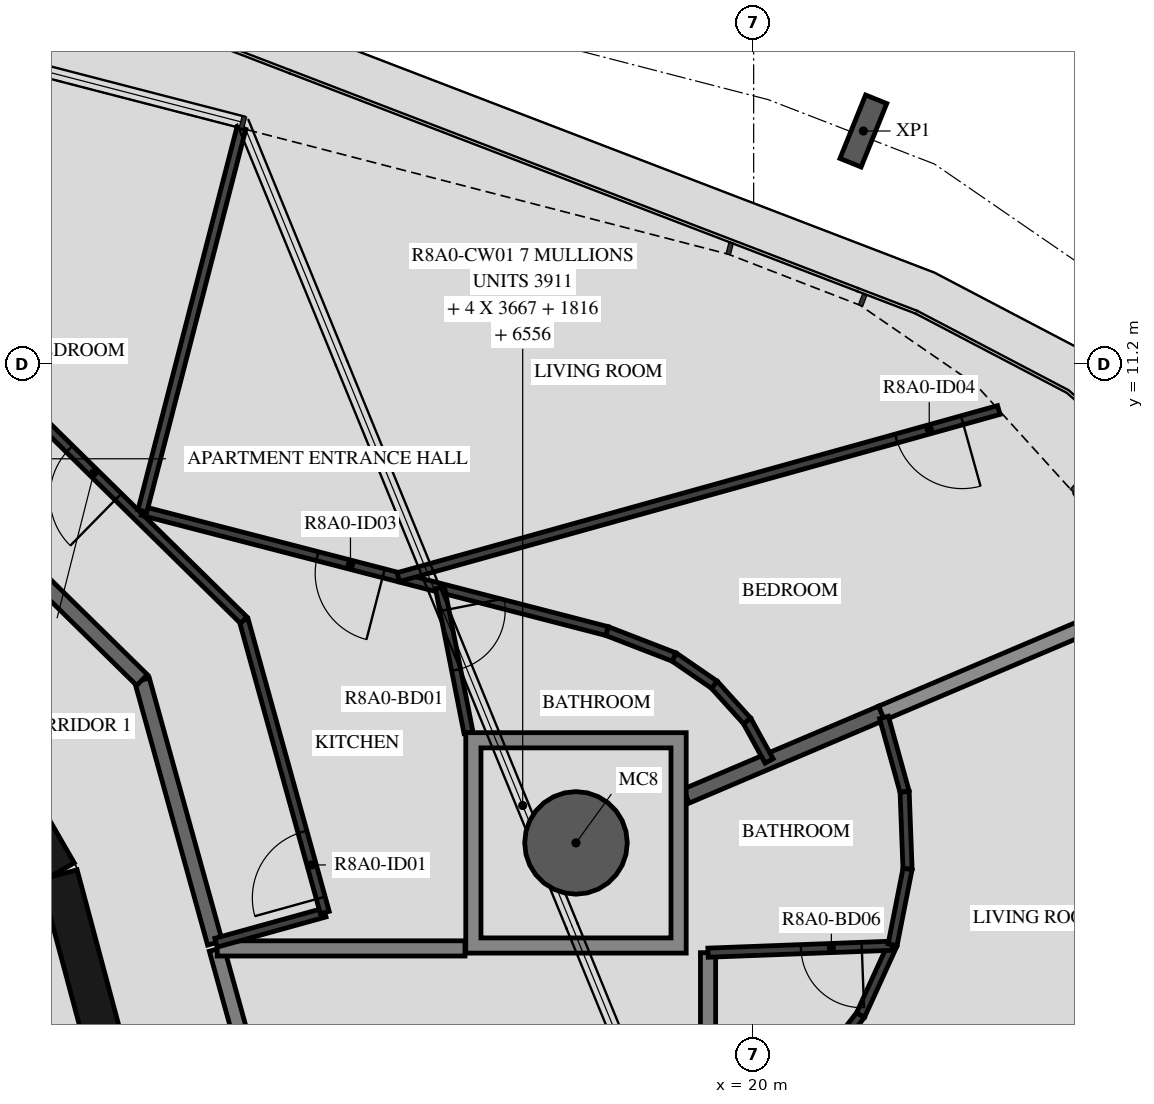
"""IFC4 building model, lengths in metres.
Left out: names, types, materials, properties, quantities, classifications, styles, units other than length and angle.
Written with IfcOpenShell. Run it as: python <this file> out.ifc"""

import sys

from ifc_helpers import new_model, si_unit, direction, frame, frame_2d, origin, origin_2d, place, context, subcontext, project, spatial, polyline, rectangle, hollow_circle, i_section, outline, extrude, element, fill, save


model = new_model("IFC4")
c1 = context("Model", 3, precision=1e-05, world=origin(), true_north=direction((0.0, 1.0)))
c2 = subcontext(c1, "Body", "Model", "MODEL_VIEW")
j1 = project(units=[si_unit("LENGTHUNIT", "METRE"), si_unit("PLANEANGLEUNIT", "RADIAN")], contexts=[c1])
p1 = place(None, origin())
s1 = spatial("IfcSite", under=j1, at=p1, CompositionType="ELEMENT")
p2 = place(p1, origin())
s2 = spatial("IfcBuilding", under=s1, at=p2, CompositionType="ELEMENT")
p3 = place(p2, frame((0.0, 0.0, 298.2)))
s3 = spatial("IfcBuildingStorey", under=s2, at=p3, CompositionType="ELEMENT", Elevation=298.2)
p4 = place(p3, frame((17.663, 4.898, -0.45), z_axis=(0.0, 0.0, 1.0), x_axis=(1.0, 0.0, 0.0)))
e1 = element("IfcColumn", 1, at=p4, inside=s3, PredefinedType="COLUMN", context=c2, shape_type="SweptSolid", body=[
    extrude(hollow_circle(Radius=0.675, WallThickness=0.03, at=origin_2d()), origin(), (0.0, 0.0, 1.0), 3.57),
])
p5 = place(p3, frame((21.443, 14.264, -0.45), z_axis=(0.0, 0.0, 1.0), x_axis=(0.927294785217, -0.374331913293, 0.0)))
e2 = element("IfcColumn", 2, at=p5, inside=s3, PredefinedType="COLUMN", context=c2, shape_type="SweptSolid", body=[
    extrude(i_section(OverallWidth=0.3, OverallDepth=0.9, WebThickness=0.019, FlangeThickness=0.035, FilletRadius=0.03, at=origin_2d()), origin(), (0.0, 0.0, 1.0), 3.57),
])
for number, where, z_axis, x_axis in (
    (3, (11.643, 1.55, 0.0), (0.0, 0.0, 1.0), (-0.259, 0.966, 0.0)),
    (4, (10.845, 4.51, 0.0), (0.0, 0.0, 1.0), (-0.5, 0.866, 0.0)),
):
    element("IfcWall", number, at=place(p3, frame(where, z_axis=z_axis, x_axis=x_axis)), inside=s3, PredefinedType="SHEAR", context=c2, shape_type="SweptSolid", body=[
        extrude(rectangle(XDim=3.033, YDim=0.5, at=frame_2d((1.516, 0.0))), origin(), (0.0, 0.0, 1.0), 3.12),
    ])
p6 = place(p3, frame((13.872, 0.121, 0.0), z_axis=(0.0, 0.0, 1.0), x_axis=(-0.267291928416, 0.963615600228, 0.0)))
e5 = element("IfcWall", 5, at=p6, inside=s3, PredefinedType="STANDARD", context=c2, shape_type="SweptSolid", body=[
    extrude(rectangle(XDim=3.507, YDim=0.2, at=frame_2d((1.753, 0.0))), origin(), (0.0, 0.0, 1.0), 3.12),
])
p7 = place(p3, frame((12.913, 3.581, 0.0), z_axis=(0.0, 0.0, 1.0), x_axis=(-0.267223005422, 0.963634715737, 0.0)))
e6 = element("IfcWall", 6, at=p7, inside=s3, PredefinedType="STANDARD", context=c2, shape_type="SweptSolid", body=[
    extrude(rectangle(XDim=3.591, YDim=0.2, at=frame_2d((1.795, 0.0))), origin(), (0.0, 0.0, 1.0), 3.12),
])
p8 = place(p3, frame((11.953, 7.041, 0.0), z_axis=(0.0, 0.0, 1.0), x_axis=(-0.713250549143, 0.70090916255, 0.0)))
e7 = element("IfcWall", 7, at=p8, inside=s3, PredefinedType="STANDARD", context=c2, shape_type="SweptSolid", body=[
    extrude(rectangle(XDim=7.181, YDim=0.2, at=frame_2d((3.59, 0.0))), origin(), (0.0, 0.0, 1.0), 3.12),
])
p9 = place(p8, frame((2.6, 0.0, 0.0)))
e8 = element("IfcOpeningElement", 8, at=p9, cuts=e7, PredefinedType="OPENING", context=c2, shape_type="SweptSolid", body=[
    extrude(rectangle(XDim=1.0, YDim=2.1, at=frame_2d((0.5, 1.05))), frame((0.0, 0.11, 0.0), z_axis=(0.0, -1.0, 0.0), x_axis=(1.0, 0.0, 0.0)), (0.0, 0.0, 1.0), 0.22),
])
p10 = place(p3, frame((16.203, 3.51, 0.0), z_axis=(0.0, 0.0, 1.0), x_axis=(-1.0, 0.0, 0.0)))
e9 = element("IfcWall", 9, at=p10, inside=s3, PredefinedType="STANDARD", context=c2, shape_type="SweptSolid", body=[
    extrude(rectangle(XDim=3.26, YDim=0.2, at=frame_2d((1.63, 0.0))), origin(), (0.0, 0.0, 1.0), 3.12),
])
p11 = place(p3, frame((19.4, 0.389, 0.0), z_axis=(0.0, 0.0, 1.0), x_axis=(0.0, 1.0, 0.0)))
e10 = element("IfcWall", 10, at=p11, inside=s3, PredefinedType="STANDARD", context=c2, shape_type="SweptSolid", body=[
    extrude(rectangle(XDim=3.065, YDim=0.2, at=frame_2d((1.533, 0.0))), origin(), (0.0, 0.0, 1.0), 3.12),
])
p12 = place(p3, frame((19.113, 5.514, 0.0), z_axis=(0.0, 0.0, 1.0), x_axis=(0.92047794988, 0.390794503268, 0.0)))
e11 = element("IfcWall", 11, at=p12, inside=s3, PredefinedType="STANDARD", context=c2, shape_type="SweptSolid", body=[
    extrude(rectangle(XDim=2.793, YDim=0.2, at=frame_2d((1.396, 0.0))), origin(), (0.0, 0.0, 1.0), 3.12),
])
p13 = place(p3, frame((21.684, 6.605, 0.0), z_axis=(0.0, 0.0, 1.0), x_axis=(0.920517820403, 0.390700578859, 0.0)))
e12 = element("IfcWall", 12, at=p13, inside=s3, PredefinedType="STANDARD", context=c2, shape_type="SweptSolid", body=[
    extrude(rectangle(XDim=3.619, YDim=0.2, at=frame_2d((1.809, 0.0))), origin(), (0.0, 0.0, 1.0), 2.73),
])
p14 = place(p3, frame((12.927, 3.585, 0.0), z_axis=(0.0, 0.0, 1.0), x_axis=(0.963616756608, 0.26728775951, 0.0)))
e13 = element("IfcWall", 13, at=p14, inside=s3, PredefinedType="PARTITIONING", context=c2, shape_type="SweptSolid", body=[
    extrude(rectangle(XDim=1.485, YDim=0.12, at=frame_2d((0.743, 0.0))), origin(), (0.0, 0.0, 1.0), 3.12),
])
p15 = place(p3, frame((14.358, 3.982, 0.0), z_axis=(0.0, 0.0, 1.0), x_axis=(-0.267233823916, 0.963631715623, 0.0)))
e14 = element("IfcWall", 14, at=p15, inside=s3, PredefinedType="PARTITIONING", context=c2, shape_type="SweptSolid", body=[
    extrude(rectangle(XDim=3.992, YDim=0.12, at=frame_2d((1.996, 0.0))), origin(), (0.0, 0.0, 1.0), 3.12),
])
p16 = place(p15, frame((0.2, 0.0, 0.0)))
e15 = element("IfcOpeningElement", 15, at=p16, cuts=e14, PredefinedType="OPENING", context=c2, shape_type="SweptSolid", body=[
    extrude(rectangle(XDim=0.9, YDim=2.1, at=frame_2d((0.45, 1.05))), frame((0.0, 0.07, 0.0), z_axis=(0.0, -1.0, 0.0), x_axis=(1.0, 0.0, 0.0)), (0.0, 0.0, 1.0), 0.14),
])
p17 = place(p3, frame((13.291, 7.829, 0.0), z_axis=(0.0, 0.0, 1.0), x_axis=(-0.713255978622, 0.700903637428, 0.0)))
e16 = element("IfcWall", 16, at=p17, inside=s3, PredefinedType="PARTITIONING", context=c2, shape_type="SweptSolid", body=[
    extrude(rectangle(XDim=7.985, YDim=0.12, at=frame_2d((3.992, 0.0))), origin(), (0.0, 0.0, 1.0), 3.12),
])
p18 = place(p17, frame((2.314, 0.0, 0.0)))
e17 = element("IfcOpeningElement", 17, at=p18, cuts=e16, PredefinedType="OPENING", context=c2, shape_type="SweptSolid", body=[
    extrude(rectangle(XDim=0.9, YDim=2.1, at=frame_2d((0.45, 1.05))), frame((0.0, 0.07, 0.0), z_axis=(0.0, -1.0, 0.0), x_axis=(1.0, 0.0, 0.0)), (0.0, 0.0, 1.0), 0.14),
])
p19 = place(p3, frame((20.203, 5.977, 0.0), z_axis=(0.0, 0.0, 1.0), x_axis=(-0.482261544721, 0.876027284098, 0.0)))
e18 = element("IfcWall", 18, at=p19, inside=s3, PredefinedType="PARTITIONING", context=c2, shape_type="SweptSolid", body=[
    extrude(rectangle(XDim=0.601, YDim=0.12, at=frame_2d((0.301, 0.0))), origin(), (0.0, 0.0, 1.0), 3.12),
])
for number, where, z_axis, x_axis in (
    (19, (19.913, 6.504, 0.0), (0.0, 0.0, 1.0), (-0.671, 0.741, 0.0)),
    (20, (19.482, 6.979, 0.0), (0.0, 0.0, 1.0), (-0.824, 0.566, 0.0)),
):
    element("IfcWall", number, at=place(p3, frame(where, z_axis=z_axis, x_axis=x_axis)), inside=s3, PredefinedType="PARTITIONING", context=c2, shape_type="SweptSolid", body=[
        extrude(rectangle(XDim=0.642, YDim=0.12, at=frame_2d((0.321, 0.0))), origin(), (0.0, 0.0, 1.0), 3.12),
    ])
p20 = place(p3, frame((18.953, 7.343, 0.0), z_axis=(0.0, 0.0, 1.0), x_axis=(-0.932458839957, 0.361276226433, 0.0)))
e21 = element("IfcWall", 21, at=p20, inside=s3, PredefinedType="PARTITIONING", context=c2, shape_type="SweptSolid", body=[
    extrude(rectangle(XDim=0.947, YDim=0.12, at=frame_2d((0.473, 0.0))), origin(), (0.0, 0.0, 1.0), 3.12),
])
p21 = place(p3, frame((18.071, 7.685, 0.0), z_axis=(0.0, 0.0, 1.0), x_axis=(-0.968152245082, 0.250362198309, 0.0)))
e22 = element("IfcWall", 22, at=p21, inside=s3, PredefinedType="PARTITIONING", context=c2, shape_type="SweptSolid", body=[
    extrude(rectangle(XDim=6.313, YDim=0.12, at=frame_2d((3.157, 0.0))), origin(), (0.0, 0.0, 1.0), 3.12),
])
p22 = place(p21, frame((3.036, 0.0, 0.0)))
e23 = element("IfcOpeningElement", 23, at=p22, cuts=e22, PredefinedType="OPENING", context=c2, shape_type="SweptSolid", body=[
    extrude(rectangle(XDim=0.9, YDim=2.1, at=frame_2d((0.45, 1.05))), frame((0.0, 0.07, 0.0), z_axis=(0.0, -1.0, 0.0), x_axis=(1.0, 0.0, 0.0)), (0.0, 0.0, 1.0), 0.14),
])
p23 = place(p3, frame((15.873, 8.253, 0.0), z_axis=(0.0, 0.0, 1.0), x_axis=(0.19340687816, -0.981118636802, 0.0)))
e24 = element("IfcWall", 24, at=p23, inside=s3, PredefinedType="PARTITIONING", context=c2, shape_type="SweptSolid", body=[
    extrude(rectangle(XDim=1.941, YDim=0.12, at=frame_2d((0.971, 0.0))), origin(), (0.0, 0.0, 1.0), 3.12),
])
p24 = place(p23, frame((0.3, 0.0, 0.0)))
e25 = element("IfcOpeningElement", 25, at=p24, cuts=e24, PredefinedType="OPENING", context=c2, shape_type="SweptSolid", body=[
    extrude(rectangle(XDim=0.8, YDim=2.1, at=frame_2d((0.4, 1.05))), frame((0.0, 0.07, 0.0), z_axis=(0.0, -1.0, 0.0), x_axis=(1.0, 0.0, 0.0)), (0.0, 0.0, 1.0), 0.14),
])
p25 = place(p3, frame((23.225, 10.593, 0.0), z_axis=(0.0, 0.0, 1.0), x_axis=(-0.963409492722, -0.268033858559, 0.0)))
e26 = element("IfcWall", 26, at=p25, inside=s3, PredefinedType="PARTITIONING", context=c2, shape_type="SweptSolid", body=[
    extrude(rectangle(XDim=8.2, YDim=0.12, at=frame_2d((4.1, 0.0))), origin(), (0.0, 0.0, 1.0), 3.12),
])
p26 = place(p25, frame((0.5, 0.0, 0.0)))
e27 = element("IfcOpeningElement", 27, at=p26, cuts=e26, PredefinedType="OPENING", context=c2, shape_type="SweptSolid", body=[
    extrude(rectangle(XDim=0.9, YDim=2.1, at=frame_2d((0.45, 1.05))), frame((0.0, 0.07, 0.0), z_axis=(0.0, -1.0, 0.0), x_axis=(1.0, 0.0, 0.0)), (0.0, 0.0, 1.0), 0.14),
])
p27 = place(p3, frame((13.26, 14.3, 0.0), z_axis=(0.0, 0.0, 1.0), x_axis=(-0.25038206324, -0.968147107834, 0.0)))
e28 = element("IfcWall", 28, at=p27, inside=s3, PredefinedType="PARTITIONING", context=c2, shape_type="SweptSolid", body=[
    extrude(rectangle(XDim=5.2, YDim=0.12, at=frame_2d((2.6, 0.0))), origin(), (0.0, 0.0, 1.0), 2.73),
])
p28 = place(p3, frame((20.781, 1.829, 0.0), z_axis=(0.0, 0.0, 1.0), x_axis=(0.613326972183, 0.789829111386, 0.0)))
e29 = element("IfcWall", 29, at=p28, inside=s3, PredefinedType="PARTITIONING", context=c2, shape_type="SweptSolid", body=[
    extrude(rectangle(XDim=1.02, YDim=0.12, at=frame_2d((0.51, 0.0))), origin(), (0.0, 0.0, 1.0), 3.12),
])
p29 = place(p3, frame((21.406, 2.634, 0.0), z_axis=(0.0, 0.0, 1.0), x_axis=(0.414726005229, 0.909946339399, 0.0)))
e30 = element("IfcWall", 30, at=p29, inside=s3, PredefinedType="PARTITIONING", context=c2, shape_type="SweptSolid", body=[
    extrude(rectangle(XDim=1.016, YDim=0.12, at=frame_2d((0.508, 0.0))), origin(), (0.0, 0.0, 1.0), 3.12),
])
p30 = place(p3, frame((21.822, 3.545, 0.0), z_axis=(0.0, 0.0, 1.0), x_axis=(-0.999286397149, -0.037771635816, 0.0)))
e31 = element("IfcWall", 31, at=p30, inside=s3, PredefinedType="PARTITIONING", context=c2, shape_type="SweptSolid", body=[
    extrude(rectangle(XDim=2.424, YDim=0.12, at=frame_2d((1.212, 0.0))), origin(), (0.0, 0.0, 1.0), 3.12),
])
p31 = place(p30, frame((0.4, 0.0, 0.0)))
e32 = element("IfcOpeningElement", 32, at=p31, cuts=e31, PredefinedType="OPENING", context=c2, shape_type="SweptSolid", body=[
    extrude(rectangle(XDim=0.8, YDim=2.1, at=frame_2d((0.4, 1.05))), frame((0.0, 0.07, 0.0), z_axis=(0.0, -1.0, 0.0), x_axis=(1.0, 0.0, 0.0)), (0.0, 0.0, 1.0), 0.14),
])
for number, where, z_axis, x_axis in (
    (33, (21.715, 6.549, 0.0), (0.0, 0.0, 1.0), (0.267, -0.964, 0.0)),
    (34, (21.986, 5.57, 0.0), (0.0, 0.0, 1.0), (0.038, -0.999, 0.0)),
    (35, (22.025, 4.555, 0.0), (0.0, 0.0, 1.0), (-0.194, -0.981, 0.0)),
):
    element("IfcWall", number, at=place(p3, frame(where, z_axis=z_axis, x_axis=x_axis)), inside=s3, PredefinedType="PARTITIONING", context=c2, shape_type="SweptSolid", body=[
        extrude(rectangle(XDim=1.016, YDim=0.12, at=frame_2d((0.508, 0.0))), origin(), (0.0, 0.0, 1.0), 3.12),
    ])
p32 = place(p3, origin())
e36 = element("IfcWall", 36, at=p32, inside=s3, PredefinedType="STANDARD", context=c2, shape_type="SweptSolid", body=[
    extrude(outline(polyline([(19.113, 6.348), (19.113, 3.448), (16.213, 3.448), (16.213, 6.348), (19.113, 6.348)]), holes=[polyline([(16.413, 3.648), (18.913, 3.648), (18.913, 6.148), (16.413, 6.148), (16.413, 3.648)])]), origin(), (0.0, 0.0, 1.0), 3.12),
])
p33 = place(p16, origin())
e37 = element("IfcDoor", 37, at=p33, inside=s3, OperationType="SINGLE_SWING_LEFT", PredefinedType="DOOR", context=c2, shape_type="SweptSolid", body=[
    extrude(rectangle(XDim=0.9, YDim=2.1, at=frame_2d((0.45, 1.05))), frame((0.0, 0.025, 0.0), z_axis=(0.0, -1.0, 0.0), x_axis=(1.0, 0.0, 0.0)), (0.0, 0.0, 1.0), 0.05),
])
fill(e15, e37)
p34 = place(p18, origin())
e38 = element("IfcDoor", 38, at=p34, inside=s3, OperationType="SINGLE_SWING_LEFT", PredefinedType="DOOR", context=c2, shape_type="SweptSolid", body=[
    extrude(rectangle(XDim=0.9, YDim=2.1, at=frame_2d((0.45, 1.05))), frame((0.0, 0.025, 0.0), z_axis=(0.0, -1.0, 0.0), x_axis=(1.0, 0.0, 0.0)), (0.0, 0.0, 1.0), 0.05),
])
fill(e17, e38)
p35 = place(p24, origin())
e39 = element("IfcDoor", 39, at=p35, inside=s3, OperationType="SINGLE_SWING_LEFT", PredefinedType="DOOR", context=c2, shape_type="SweptSolid", body=[
    extrude(rectangle(XDim=0.8, YDim=2.1, at=frame_2d((0.4, 1.05))), frame((0.0, 0.025, 0.0), z_axis=(0.0, -1.0, 0.0), x_axis=(1.0, 0.0, 0.0)), (0.0, 0.0, 1.0), 0.05),
])
fill(e25, e39)
p36 = place(p22, origin())
e40 = element("IfcDoor", 40, at=p36, inside=s3, OperationType="SINGLE_SWING_LEFT", PredefinedType="DOOR", context=c2, shape_type="SweptSolid", body=[
    extrude(rectangle(XDim=0.9, YDim=2.1, at=frame_2d((0.45, 1.05))), frame((0.0, 0.025, 0.0), z_axis=(0.0, -1.0, 0.0), x_axis=(1.0, 0.0, 0.0)), (0.0, 0.0, 1.0), 0.05),
])
fill(e23, e40)
p37 = place(p26, origin())
e41 = element("IfcDoor", 41, at=p37, inside=s3, OperationType="SINGLE_SWING_LEFT", PredefinedType="DOOR", context=c2, shape_type="SweptSolid", body=[
    extrude(rectangle(XDim=0.9, YDim=2.1, at=frame_2d((0.45, 1.05))), frame((0.0, 0.025, 0.0), z_axis=(0.0, -1.0, 0.0), x_axis=(1.0, 0.0, 0.0)), (0.0, 0.0, 1.0), 0.05),
])
fill(e27, e41)
p38 = place(p31, origin())
e42 = element("IfcDoor", 42, at=p38, inside=s3, OperationType="SINGLE_SWING_RIGHT", PredefinedType="DOOR", context=c2, shape_type="SweptSolid", body=[
    extrude(rectangle(XDim=0.8, YDim=2.1, at=frame_2d((0.4, 1.05))), frame((0.0, 0.025, 0.0), z_axis=(0.0, -1.0, 0.0), x_axis=(1.0, 0.0, 0.0)), (0.0, 0.0, 1.0), 0.05),
])
fill(e32, e42)
save(model, sys.argv[1])
